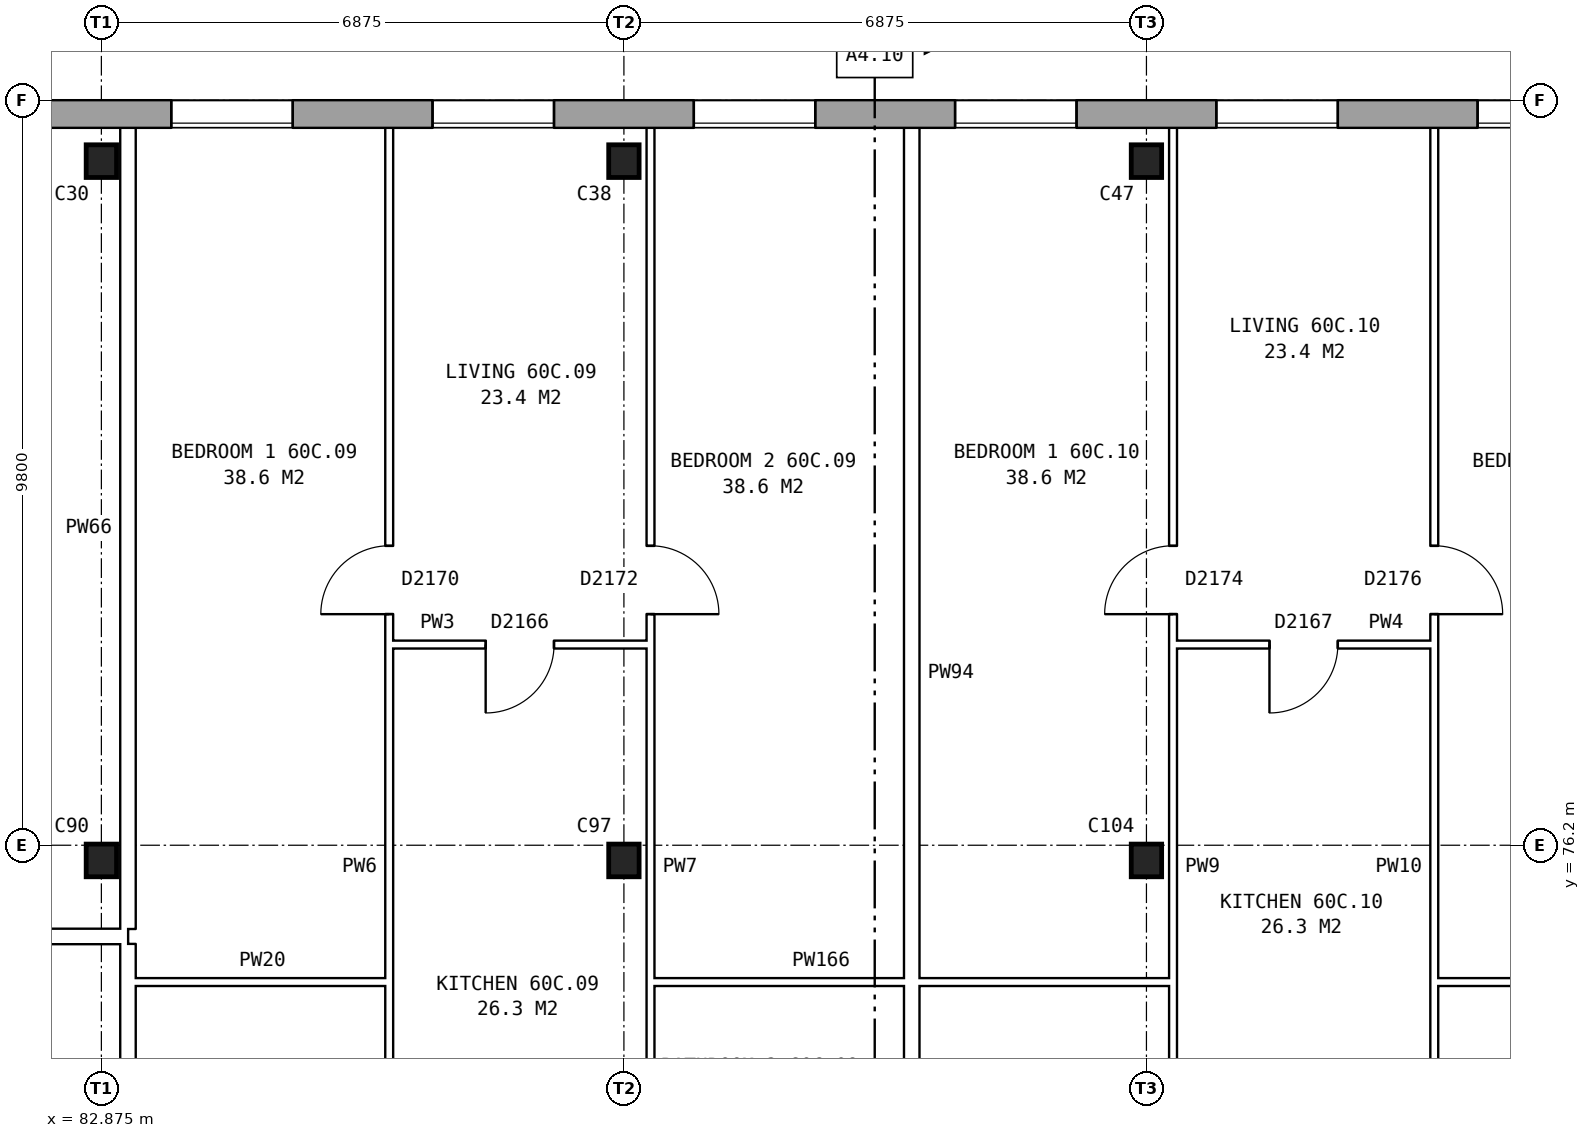
"""IFC4 building model, lengths in metres.
Left out: names, types, materials, properties, quantities, classifications, styles, units other than length and angle.
Written with IfcOpenShell. Run it as: python <this file> out.ifc"""

import sys

from ifc_helpers import new_model, si_unit, direction, frame, frame_2d, origin, origin_2d, place, context, subcontext, project, spatial, rectangle, i_section, extrude, element, fill, save


model = new_model("IFC4")
c1 = context("Model", 3, precision=1e-05, world=origin(), true_north=direction((0.0, 1.0)))
c2 = subcontext(c1, "Body", "Model", "MODEL_VIEW")
j1 = project(units=[si_unit("LENGTHUNIT", "METRE"), si_unit("PLANEANGLEUNIT", "RADIAN")], contexts=[c1])
p1 = place(None, origin())
s1 = spatial("IfcSite", under=j1, at=p1, CompositionType="ELEMENT")
p2 = place(p1, origin())
s2 = spatial("IfcBuilding", under=s1, at=p2, CompositionType="ELEMENT")
p3 = place(p2, frame((0.0, 0.0, 212.1)))
s3 = spatial("IfcBuildingStorey", under=s2, at=p3, CompositionType="ELEMENT", Elevation=212.1)
for number, where, z_axis, x_axis in (
    (1, (82.875, 76.0, 0.0), (0.0, 0.0, 1.0), (1.0, 0.0, 0.0)),
    (2, (89.75, 76.0, 0.0), (0.0, 0.0, 1.0), (1.0, 0.0, 0.0)),
    (3, (96.625, 76.0, 0.0), (0.0, 0.0, 1.0), (1.0, 0.0, 0.0)),
    (4, (82.875, 85.2, 0.0), (0.0, 0.0, 1.0), (1.0, 0.0, 0.0)),
    (5, (89.75, 85.2, 0.0), (0.0, 0.0, 1.0), (1.0, 0.0, 0.0)),
    (6, (96.625, 85.2, 0.0), (0.0, 0.0, 1.0), (1.0, 0.0, 0.0)),
):
    element("IfcColumn", number, at=place(p3, frame(where, z_axis=z_axis, x_axis=x_axis)), inside=s3, PredefinedType="COLUMN", context=c2, shape_type="SweptSolid", body=[
        extrude(i_section(OverallWidth=0.4, OverallDepth=0.43, WebThickness=0.04, FlangeThickness=0.04, at=origin_2d()), origin(), (0.0, 0.0, 1.0), 2.85),
    ])
p4 = place(p3, frame((131.05, 85.82, 0.0), z_axis=(0.0, 0.0, 1.0), x_axis=(-1.0, 0.0, 0.0)))
e7 = element("IfcWall", 7, at=p4, inside=s3, PredefinedType="STANDARD", context=c2, shape_type="SweptSolid", body=[
    extrude(rectangle(XDim=55.1, YDim=0.36, at=frame_2d((27.55, 0.0))), origin(), (0.0, 0.0, 1.0), 2.85),
])
p5 = place(p4, frame((0.969, 0.0, 0.8)))
e8 = element("IfcOpeningElement", 8, at=p5, cuts=e7, PredefinedType="OPENING", context=c2, shape_type="SweptSolid", body=[
    extrude(rectangle(XDim=1.6, YDim=1.8, at=frame_2d((0.8, 0.9))), frame((0.0, 0.19, 0.0), z_axis=(0.0, -1.0, 0.0), x_axis=(1.0, 0.0, 0.0)), (0.0, 0.0, 1.0), 0.38),
])
p6 = place(p4, frame((4.406, 0.0, 0.8)))
e9 = element("IfcOpeningElement", 9, at=p6, cuts=e7, PredefinedType="OPENING", context=c2, shape_type="SweptSolid", body=[
    extrude(rectangle(XDim=1.6, YDim=1.8, at=frame_2d((0.8, 0.9))), frame((0.0, 0.19, 0.0), z_axis=(0.0, -1.0, 0.0), x_axis=(1.0, 0.0, 0.0)), (0.0, 0.0, 1.0), 0.38),
])
p7 = place(p4, frame((7.844, 0.0, 0.8)))
e10 = element("IfcOpeningElement", 10, at=p7, cuts=e7, PredefinedType="OPENING", context=c2, shape_type="SweptSolid", body=[
    extrude(rectangle(XDim=1.6, YDim=1.8, at=frame_2d((0.8, 0.9))), frame((0.0, 0.19, 0.0), z_axis=(0.0, -1.0, 0.0), x_axis=(1.0, 0.0, 0.0)), (0.0, 0.0, 1.0), 0.38),
])
p8 = place(p4, frame((11.281, 0.0, 0.8)))
e11 = element("IfcOpeningElement", 11, at=p8, cuts=e7, PredefinedType="OPENING", context=c2, shape_type="SweptSolid", body=[
    extrude(rectangle(XDim=1.6, YDim=1.8, at=frame_2d((0.8, 0.9))), frame((0.0, 0.19, 0.0), z_axis=(0.0, -1.0, 0.0), x_axis=(1.0, 0.0, 0.0)), (0.0, 0.0, 1.0), 0.38),
])
p9 = place(p4, frame((14.719, 0.0, 0.8)))
e12 = element("IfcOpeningElement", 12, at=p9, cuts=e7, PredefinedType="OPENING", context=c2, shape_type="SweptSolid", body=[
    extrude(rectangle(XDim=1.6, YDim=1.8, at=frame_2d((0.8, 0.9))), frame((0.0, 0.19, 0.0), z_axis=(0.0, -1.0, 0.0), x_axis=(1.0, 0.0, 0.0)), (0.0, 0.0, 1.0), 0.38),
])
p10 = place(p4, frame((18.156, 0.0, 0.8)))
e13 = element("IfcOpeningElement", 13, at=p10, cuts=e7, PredefinedType="OPENING", context=c2, shape_type="SweptSolid", body=[
    extrude(rectangle(XDim=1.6, YDim=1.8, at=frame_2d((0.8, 0.9))), frame((0.0, 0.19, 0.0), z_axis=(0.0, -1.0, 0.0), x_axis=(1.0, 0.0, 0.0)), (0.0, 0.0, 1.0), 0.38),
])
p11 = place(p4, frame((21.594, 0.0, 0.8)))
e14 = element("IfcOpeningElement", 14, at=p11, cuts=e7, PredefinedType="OPENING", context=c2, shape_type="SweptSolid", body=[
    extrude(rectangle(XDim=1.6, YDim=1.8, at=frame_2d((0.8, 0.9))), frame((0.0, 0.19, 0.0), z_axis=(0.0, -1.0, 0.0), x_axis=(1.0, 0.0, 0.0)), (0.0, 0.0, 1.0), 0.38),
])
p12 = place(p4, frame((25.031, 0.0, 0.8)))
e15 = element("IfcOpeningElement", 15, at=p12, cuts=e7, PredefinedType="OPENING", context=c2, shape_type="SweptSolid", body=[
    extrude(rectangle(XDim=1.6, YDim=1.8, at=frame_2d((0.8, 0.9))), frame((0.0, 0.19, 0.0), z_axis=(0.0, -1.0, 0.0), x_axis=(1.0, 0.0, 0.0)), (0.0, 0.0, 1.0), 0.38),
])
p13 = place(p4, frame((28.469, 0.0, 0.8)))
e16 = element("IfcOpeningElement", 16, at=p13, cuts=e7, PredefinedType="OPENING", context=c2, shape_type="SweptSolid", body=[
    extrude(rectangle(XDim=1.6, YDim=1.8, at=frame_2d((0.8, 0.9))), frame((0.0, 0.19, 0.0), z_axis=(0.0, -1.0, 0.0), x_axis=(1.0, 0.0, 0.0)), (0.0, 0.0, 1.0), 0.38),
])
p14 = place(p4, frame((31.906, 0.0, 0.8)))
e17 = element("IfcOpeningElement", 17, at=p14, cuts=e7, PredefinedType="OPENING", context=c2, shape_type="SweptSolid", body=[
    extrude(rectangle(XDim=1.6, YDim=1.8, at=frame_2d((0.8, 0.9))), frame((0.0, 0.19, 0.0), z_axis=(0.0, -1.0, 0.0), x_axis=(1.0, 0.0, 0.0)), (0.0, 0.0, 1.0), 0.38),
])
p15 = place(p4, frame((35.344, 0.0, 0.8)))
e18 = element("IfcOpeningElement", 18, at=p15, cuts=e7, PredefinedType="OPENING", context=c2, shape_type="SweptSolid", body=[
    extrude(rectangle(XDim=1.6, YDim=1.8, at=frame_2d((0.8, 0.9))), frame((0.0, 0.19, 0.0), z_axis=(0.0, -1.0, 0.0), x_axis=(1.0, 0.0, 0.0)), (0.0, 0.0, 1.0), 0.38),
])
p16 = place(p4, frame((38.781, 0.0, 0.8)))
e19 = element("IfcOpeningElement", 19, at=p16, cuts=e7, PredefinedType="OPENING", context=c2, shape_type="SweptSolid", body=[
    extrude(rectangle(XDim=1.6, YDim=1.8, at=frame_2d((0.8, 0.9))), frame((0.0, 0.19, 0.0), z_axis=(0.0, -1.0, 0.0), x_axis=(1.0, 0.0, 0.0)), (0.0, 0.0, 1.0), 0.38),
])
p17 = place(p4, frame((42.219, 0.0, 0.8)))
e20 = element("IfcOpeningElement", 20, at=p17, cuts=e7, PredefinedType="OPENING", context=c2, shape_type="SweptSolid", body=[
    extrude(rectangle(XDim=1.6, YDim=1.8, at=frame_2d((0.8, 0.9))), frame((0.0, 0.19, 0.0), z_axis=(0.0, -1.0, 0.0), x_axis=(1.0, 0.0, 0.0)), (0.0, 0.0, 1.0), 0.38),
])
p18 = place(p4, frame((45.656, 0.0, 0.8)))
e21 = element("IfcOpeningElement", 21, at=p18, cuts=e7, PredefinedType="OPENING", context=c2, shape_type="SweptSolid", body=[
    extrude(rectangle(XDim=1.6, YDim=1.8, at=frame_2d((0.8, 0.9))), frame((0.0, 0.19, 0.0), z_axis=(0.0, -1.0, 0.0), x_axis=(1.0, 0.0, 0.0)), (0.0, 0.0, 1.0), 0.38),
])
p19 = place(p4, frame((49.094, 0.0, 0.8)))
e22 = element("IfcOpeningElement", 22, at=p19, cuts=e7, PredefinedType="OPENING", context=c2, shape_type="SweptSolid", body=[
    extrude(rectangle(XDim=1.6, YDim=1.8, at=frame_2d((0.8, 0.9))), frame((0.0, 0.19, 0.0), z_axis=(0.0, -1.0, 0.0), x_axis=(1.0, 0.0, 0.0)), (0.0, 0.0, 1.0), 0.38),
])
p20 = place(p4, frame((52.531, 0.0, 0.8)))
e23 = element("IfcOpeningElement", 23, at=p20, cuts=e7, PredefinedType="OPENING", context=c2, shape_type="SweptSolid", body=[
    extrude(rectangle(XDim=1.6, YDim=1.8, at=frame_2d((0.8, 0.9))), frame((0.0, 0.19, 0.0), z_axis=(0.0, -1.0, 0.0), x_axis=(1.0, 0.0, 0.0)), (0.0, 0.0, 1.0), 0.38),
])
p21 = place(p3, frame((83.325, 74.4, 0.0), z_axis=(0.0, 0.0, 1.0), x_axis=(1.0, 0.0, 0.0)))
e24 = element("IfcWall", 24, at=p21, inside=s3, PredefinedType="PARTITIONING", context=c2, shape_type="SweptSolid", body=[
    extrude(rectangle(XDim=3.337, YDim=0.1, at=frame_2d((1.668, 0.0))), origin(), (0.0, 0.0, 1.0), 2.85),
])
for number, where, z_axis, x_axis in (
    (25, (90.1, 74.4, 0.0), (0.0, 0.0, 1.0), (1.0, 0.0, 0.0)),
    (26, (100.412, 74.4, 0.0), (0.0, 0.0, 1.0), (1.0, 0.0, 0.0)),
):
    element("IfcWall", number, at=place(p3, frame(where, z_axis=z_axis, x_axis=x_axis)), inside=s3, PredefinedType="PARTITIONING", context=c2, shape_type="SweptSolid", body=[
        extrude(rectangle(XDim=6.875, YDim=0.1, at=frame_2d((3.438, 0.0))), origin(), (0.0, 0.0, 1.0), 2.85),
    ])
p22 = place(p3, frame((75.64, 75.0, 0.0), z_axis=(0.0, 0.0, 1.0), x_axis=(1.0, 0.0, 0.0)))
e27 = element("IfcWall", 27, at=p22, inside=s3, PredefinedType="PARTITIONING", context=c2, shape_type="SweptSolid", body=[
    extrude(rectangle(XDim=7.585, YDim=0.2, at=frame_2d((3.792, 0.0))), origin(), (0.0, 0.0, 1.0), 2.85),
])
p23 = place(p22, frame((3.343, 0.0, 0.0)))
e28 = element("IfcOpeningElement", 28, at=p23, cuts=e27, PredefinedType="OPENING", context=c2, shape_type="SweptSolid", body=[
    extrude(rectangle(XDim=0.9, YDim=2.1, at=frame_2d((0.45, 1.05))), frame((0.0, 0.11, 0.0), z_axis=(0.0, -1.0, 0.0), x_axis=(1.0, 0.0, 0.0)), (0.0, 0.0, 1.0), 0.22),
])
p24 = place(p3, frame((86.662, 78.84, 0.0), z_axis=(0.0, 0.0, 1.0), x_axis=(1.0, 0.0, 0.0)))
e29 = element("IfcWall", 29, at=p24, inside=s3, PredefinedType="PARTITIONING", context=c2, shape_type="SweptSolid", body=[
    extrude(rectangle(XDim=3.438, YDim=0.1, at=frame_2d((1.719, 0.0))), origin(), (0.0, 0.0, 1.0), 2.85),
])
p25 = place(p24, frame((1.269, 0.0, 0.0)))
e30 = element("IfcOpeningElement", 30, at=p25, cuts=e29, PredefinedType="OPENING", context=c2, shape_type="SweptSolid", body=[
    extrude(rectangle(XDim=0.9, YDim=2.1, at=frame_2d((0.45, 1.05))), frame((0.0, 0.06, 0.0), z_axis=(0.0, -1.0, 0.0), x_axis=(1.0, 0.0, 0.0)), (0.0, 0.0, 1.0), 0.12),
])
p26 = place(p3, frame((96.975, 78.84, 0.0), z_axis=(0.0, 0.0, 1.0), x_axis=(1.0, 0.0, 0.0)))
e31 = element("IfcWall", 31, at=p26, inside=s3, PredefinedType="PARTITIONING", context=c2, shape_type="SweptSolid", body=[
    extrude(rectangle(XDim=3.437, YDim=0.1, at=frame_2d((1.719, 0.0))), origin(), (0.0, 0.0, 1.0), 2.85),
])
p27 = place(p26, frame((1.269, 0.0, 0.0)))
e32 = element("IfcOpeningElement", 32, at=p27, cuts=e31, PredefinedType="OPENING", context=c2, shape_type="SweptSolid", body=[
    extrude(rectangle(XDim=0.9, YDim=2.1, at=frame_2d((0.45, 1.05))), frame((0.0, 0.06, 0.0), z_axis=(0.0, -1.0, 0.0), x_axis=(1.0, 0.0, 0.0)), (0.0, 0.0, 1.0), 0.12),
])
p28 = place(p3, frame((83.225, 71.3, 0.0), z_axis=(0.0, 0.0, 1.0), x_axis=(0.0, 1.0, 0.0)))
e33 = element("IfcWall", 33, at=p28, inside=s3, PredefinedType="PARTITIONING", context=c2, shape_type="SweptSolid", body=[
    extrude(rectangle(XDim=3.6, YDim=0.2, at=frame_2d((1.8, 0.0))), origin(), (0.0, 0.0, 1.0), 2.85),
])
p29 = place(p3, frame((83.225, 75.1, 0.0), z_axis=(0.0, 0.0, 1.0), x_axis=(0.0, 1.0, 0.0)))
e34 = element("IfcWall", 34, at=p29, inside=s3, PredefinedType="PARTITIONING", context=c2, shape_type="SweptSolid", body=[
    extrude(rectangle(XDim=10.54, YDim=0.2, at=frame_2d((5.27, 0.0))), origin(), (0.0, 0.0, 1.0), 2.85),
])
p30 = place(p3, frame((86.662, 71.3, 0.0), z_axis=(0.0, 0.0, 1.0), x_axis=(0.0, 1.0, 0.0)))
e35 = element("IfcWall", 35, at=p30, inside=s3, PredefinedType="PARTITIONING", context=c2, shape_type="SweptSolid", body=[
    extrude(rectangle(XDim=14.34, YDim=0.1, at=frame_2d((7.17, 0.0))), origin(), (0.0, 0.0, 1.0), 2.85),
])
p31 = place(p30, frame((7.94, 0.0, 0.0)))
e36 = element("IfcOpeningElement", 36, at=p31, cuts=e35, PredefinedType="OPENING", context=c2, shape_type="SweptSolid", body=[
    extrude(rectangle(XDim=0.9, YDim=2.1, at=frame_2d((0.45, 1.05))), frame((0.0, 0.06, 0.0), z_axis=(0.0, -1.0, 0.0), x_axis=(1.0, 0.0, 0.0)), (0.0, 0.0, 1.0), 0.12),
])
p32 = place(p30, frame((0.4, 0.0, 0.0)))
e37 = element("IfcOpeningElement", 37, at=p32, cuts=e35, PredefinedType="OPENING", context=c2, shape_type="SweptSolid", body=[
    extrude(rectangle(XDim=0.9, YDim=2.1, at=frame_2d((0.45, 1.05))), frame((0.0, 0.06, 0.0), z_axis=(0.0, -1.0, 0.0), x_axis=(1.0, 0.0, 0.0)), (0.0, 0.0, 1.0), 0.12),
])
p33 = place(p3, frame((90.1, 71.3, 0.0), z_axis=(0.0, 0.0, 1.0), x_axis=(0.0, 1.0, 0.0)))
e38 = element("IfcWall", 38, at=p33, inside=s3, PredefinedType="PARTITIONING", context=c2, shape_type="SweptSolid", body=[
    extrude(rectangle(XDim=14.34, YDim=0.1, at=frame_2d((7.17, 0.0))), origin(), (0.0, 0.0, 1.0), 2.85),
])
p34 = place(p33, frame((7.94, 0.0, 0.0)))
e39 = element("IfcOpeningElement", 39, at=p34, cuts=e38, PredefinedType="OPENING", context=c2, shape_type="SweptSolid", body=[
    extrude(rectangle(XDim=0.9, YDim=2.1, at=frame_2d((0.45, 1.05))), frame((0.0, 0.06, 0.0), z_axis=(0.0, -1.0, 0.0), x_axis=(1.0, 0.0, 0.0)), (0.0, 0.0, 1.0), 0.12),
])
p35 = place(p33, frame((0.4, 0.0, 0.0)))
e40 = element("IfcOpeningElement", 40, at=p35, cuts=e38, PredefinedType="OPENING", context=c2, shape_type="SweptSolid", body=[
    extrude(rectangle(XDim=0.9, YDim=2.1, at=frame_2d((0.45, 1.05))), frame((0.0, 0.06, 0.0), z_axis=(0.0, -1.0, 0.0), x_axis=(1.0, 0.0, 0.0)), (0.0, 0.0, 1.0), 0.12),
])
p36 = place(p3, frame((93.537, 71.3, 0.0), z_axis=(0.0, 0.0, 1.0), x_axis=(0.0, 1.0, 0.0)))
e41 = element("IfcWall", 41, at=p36, inside=s3, PredefinedType="PARTITIONING", context=c2, shape_type="SweptSolid", body=[
    extrude(rectangle(XDim=14.34, YDim=0.2, at=frame_2d((7.17, 0.0))), origin(), (0.0, 0.0, 1.0), 2.85),
])
p37 = place(p3, frame((96.975, 71.3, 0.0), z_axis=(0.0, 0.0, 1.0), x_axis=(0.0, 1.0, 0.0)))
e42 = element("IfcWall", 42, at=p37, inside=s3, PredefinedType="PARTITIONING", context=c2, shape_type="SweptSolid", body=[
    extrude(rectangle(XDim=14.34, YDim=0.1, at=frame_2d((7.17, 0.0))), origin(), (0.0, 0.0, 1.0), 2.85),
])
p38 = place(p37, frame((7.94, 0.0, 0.0)))
e43 = element("IfcOpeningElement", 43, at=p38, cuts=e42, PredefinedType="OPENING", context=c2, shape_type="SweptSolid", body=[
    extrude(rectangle(XDim=0.9, YDim=2.1, at=frame_2d((0.45, 1.05))), frame((0.0, 0.06, 0.0), z_axis=(0.0, -1.0, 0.0), x_axis=(1.0, 0.0, 0.0)), (0.0, 0.0, 1.0), 0.12),
])
p39 = place(p37, frame((0.4, 0.0, 0.0)))
e44 = element("IfcOpeningElement", 44, at=p39, cuts=e42, PredefinedType="OPENING", context=c2, shape_type="SweptSolid", body=[
    extrude(rectangle(XDim=0.9, YDim=2.1, at=frame_2d((0.45, 1.05))), frame((0.0, 0.06, 0.0), z_axis=(0.0, -1.0, 0.0), x_axis=(1.0, 0.0, 0.0)), (0.0, 0.0, 1.0), 0.12),
])
p40 = place(p3, frame((100.412, 71.3, 0.0), z_axis=(0.0, 0.0, 1.0), x_axis=(0.0, 1.0, 0.0)))
e45 = element("IfcWall", 45, at=p40, inside=s3, PredefinedType="PARTITIONING", context=c2, shape_type="SweptSolid", body=[
    extrude(rectangle(XDim=14.34, YDim=0.1, at=frame_2d((7.17, 0.0))), origin(), (0.0, 0.0, 1.0), 2.85),
])
p41 = place(p40, frame((7.94, 0.0, 0.0)))
e46 = element("IfcOpeningElement", 46, at=p41, cuts=e45, PredefinedType="OPENING", context=c2, shape_type="SweptSolid", body=[
    extrude(rectangle(XDim=0.9, YDim=2.1, at=frame_2d((0.45, 1.05))), frame((0.0, 0.06, 0.0), z_axis=(0.0, -1.0, 0.0), x_axis=(1.0, 0.0, 0.0)), (0.0, 0.0, 1.0), 0.12),
])
p42 = place(p40, frame((0.4, 0.0, 0.0)))
e47 = element("IfcOpeningElement", 47, at=p42, cuts=e45, PredefinedType="OPENING", context=c2, shape_type="SweptSolid", body=[
    extrude(rectangle(XDim=0.9, YDim=2.1, at=frame_2d((0.45, 1.05))), frame((0.0, 0.06, 0.0), z_axis=(0.0, -1.0, 0.0), x_axis=(1.0, 0.0, 0.0)), (0.0, 0.0, 1.0), 0.12),
])
p43 = place(p13, origin())
e48 = element("IfcWindow", 48, at=p43, inside=s3, PartitioningType="SINGLE_PANEL", PredefinedType="WINDOW", context=c2, shape_type="SweptSolid", body=[
    extrude(rectangle(XDim=1.6, YDim=1.8, at=frame_2d((0.8, 0.9))), frame((0.0, 0.15, 0.0), z_axis=(0.0, -1.0, 0.0), x_axis=(1.0, 0.0, 0.0)), (0.0, 0.0, 1.0), 0.06),
])
fill(e16, e48)
p44 = place(p14, origin())
e49 = element("IfcWindow", 49, at=p44, inside=s3, PartitioningType="SINGLE_PANEL", PredefinedType="WINDOW", context=c2, shape_type="SweptSolid", body=[
    extrude(rectangle(XDim=1.6, YDim=1.8, at=frame_2d((0.8, 0.9))), frame((0.0, 0.15, 0.0), z_axis=(0.0, -1.0, 0.0), x_axis=(1.0, 0.0, 0.0)), (0.0, 0.0, 1.0), 0.06),
])
fill(e17, e49)
p45 = place(p15, origin())
e50 = element("IfcWindow", 50, at=p45, inside=s3, PartitioningType="SINGLE_PANEL", PredefinedType="WINDOW", context=c2, shape_type="SweptSolid", body=[
    extrude(rectangle(XDim=1.6, YDim=1.8, at=frame_2d((0.8, 0.9))), frame((0.0, 0.15, 0.0), z_axis=(0.0, -1.0, 0.0), x_axis=(1.0, 0.0, 0.0)), (0.0, 0.0, 1.0), 0.06),
])
fill(e18, e50)
p46 = place(p16, origin())
e51 = element("IfcWindow", 51, at=p46, inside=s3, PartitioningType="SINGLE_PANEL", PredefinedType="WINDOW", context=c2, shape_type="SweptSolid", body=[
    extrude(rectangle(XDim=1.6, YDim=1.8, at=frame_2d((0.8, 0.9))), frame((0.0, 0.15, 0.0), z_axis=(0.0, -1.0, 0.0), x_axis=(1.0, 0.0, 0.0)), (0.0, 0.0, 1.0), 0.06),
])
fill(e19, e51)
p47 = place(p17, origin())
e52 = element("IfcWindow", 52, at=p47, inside=s3, PartitioningType="SINGLE_PANEL", PredefinedType="WINDOW", context=c2, shape_type="SweptSolid", body=[
    extrude(rectangle(XDim=1.6, YDim=1.8, at=frame_2d((0.8, 0.9))), frame((0.0, 0.15, 0.0), z_axis=(0.0, -1.0, 0.0), x_axis=(1.0, 0.0, 0.0)), (0.0, 0.0, 1.0), 0.06),
])
fill(e20, e52)
p48 = place(p18, origin())
e53 = element("IfcWindow", 53, at=p48, inside=s3, PartitioningType="SINGLE_PANEL", PredefinedType="WINDOW", context=c2, shape_type="SweptSolid", body=[
    extrude(rectangle(XDim=1.6, YDim=1.8, at=frame_2d((0.8, 0.9))), frame((0.0, 0.15, 0.0), z_axis=(0.0, -1.0, 0.0), x_axis=(1.0, 0.0, 0.0)), (0.0, 0.0, 1.0), 0.06),
])
fill(e21, e53)
p49 = place(p31, origin())
e54 = element("IfcDoor", 54, at=p49, inside=s3, OperationType="SINGLE_SWING_LEFT", PredefinedType="DOOR", context=c2, shape_type="SweptSolid", body=[
    extrude(rectangle(XDim=0.9, YDim=2.1, at=frame_2d((0.45, 1.05))), frame((0.0, 0.025, 0.0), z_axis=(0.0, -1.0, 0.0), x_axis=(1.0, 0.0, 0.0)), (0.0, 0.0, 1.0), 0.05),
])
fill(e36, e54)
p50 = place(p34, frame((0.9, 0.0, 0.0), z_axis=(0.0, 0.0, 1.0), x_axis=(-1.0, 0.0, 0.0)))
e55 = element("IfcDoor", 55, at=p50, inside=s3, OperationType="SINGLE_SWING_RIGHT", PredefinedType="DOOR", context=c2, shape_type="SweptSolid", body=[
    extrude(rectangle(XDim=0.9, YDim=2.1, at=frame_2d((0.45, 1.05))), frame((0.0, 0.025, 0.0), z_axis=(0.0, -1.0, 0.0), x_axis=(1.0, 0.0, 0.0)), (0.0, 0.0, 1.0), 0.05),
])
fill(e39, e55)
p51 = place(p25, frame((0.9, 0.0, 0.0), z_axis=(0.0, 0.0, 1.0), x_axis=(-1.0, 0.0, 0.0)))
e56 = element("IfcDoor", 56, at=p51, inside=s3, OperationType="SINGLE_SWING_RIGHT", PredefinedType="DOOR", context=c2, shape_type="SweptSolid", body=[
    extrude(rectangle(XDim=0.9, YDim=2.1, at=frame_2d((0.45, 1.05))), frame((0.0, 0.025, 0.0), z_axis=(0.0, -1.0, 0.0), x_axis=(1.0, 0.0, 0.0)), (0.0, 0.0, 1.0), 0.05),
])
fill(e30, e56)
p52 = place(p38, origin())
e57 = element("IfcDoor", 57, at=p52, inside=s3, OperationType="SINGLE_SWING_LEFT", PredefinedType="DOOR", context=c2, shape_type="SweptSolid", body=[
    extrude(rectangle(XDim=0.9, YDim=2.1, at=frame_2d((0.45, 1.05))), frame((0.0, 0.025, 0.0), z_axis=(0.0, -1.0, 0.0), x_axis=(1.0, 0.0, 0.0)), (0.0, 0.0, 1.0), 0.05),
])
fill(e43, e57)
p53 = place(p41, frame((0.9, 0.0, 0.0), z_axis=(0.0, 0.0, 1.0), x_axis=(-1.0, 0.0, 0.0)))
e58 = element("IfcDoor", 58, at=p53, inside=s3, OperationType="SINGLE_SWING_RIGHT", PredefinedType="DOOR", context=c2, shape_type="SweptSolid", body=[
    extrude(rectangle(XDim=0.9, YDim=2.1, at=frame_2d((0.45, 1.05))), frame((0.0, 0.025, 0.0), z_axis=(0.0, -1.0, 0.0), x_axis=(1.0, 0.0, 0.0)), (0.0, 0.0, 1.0), 0.05),
])
fill(e46, e58)
p54 = place(p27, frame((0.9, 0.0, 0.0), z_axis=(0.0, 0.0, 1.0), x_axis=(-1.0, 0.0, 0.0)))
e59 = element("IfcDoor", 59, at=p54, inside=s3, OperationType="SINGLE_SWING_RIGHT", PredefinedType="DOOR", context=c2, shape_type="SweptSolid", body=[
    extrude(rectangle(XDim=0.9, YDim=2.1, at=frame_2d((0.45, 1.05))), frame((0.0, 0.025, 0.0), z_axis=(0.0, -1.0, 0.0), x_axis=(1.0, 0.0, 0.0)), (0.0, 0.0, 1.0), 0.05),
])
fill(e32, e59)
save(model, sys.argv[1])
